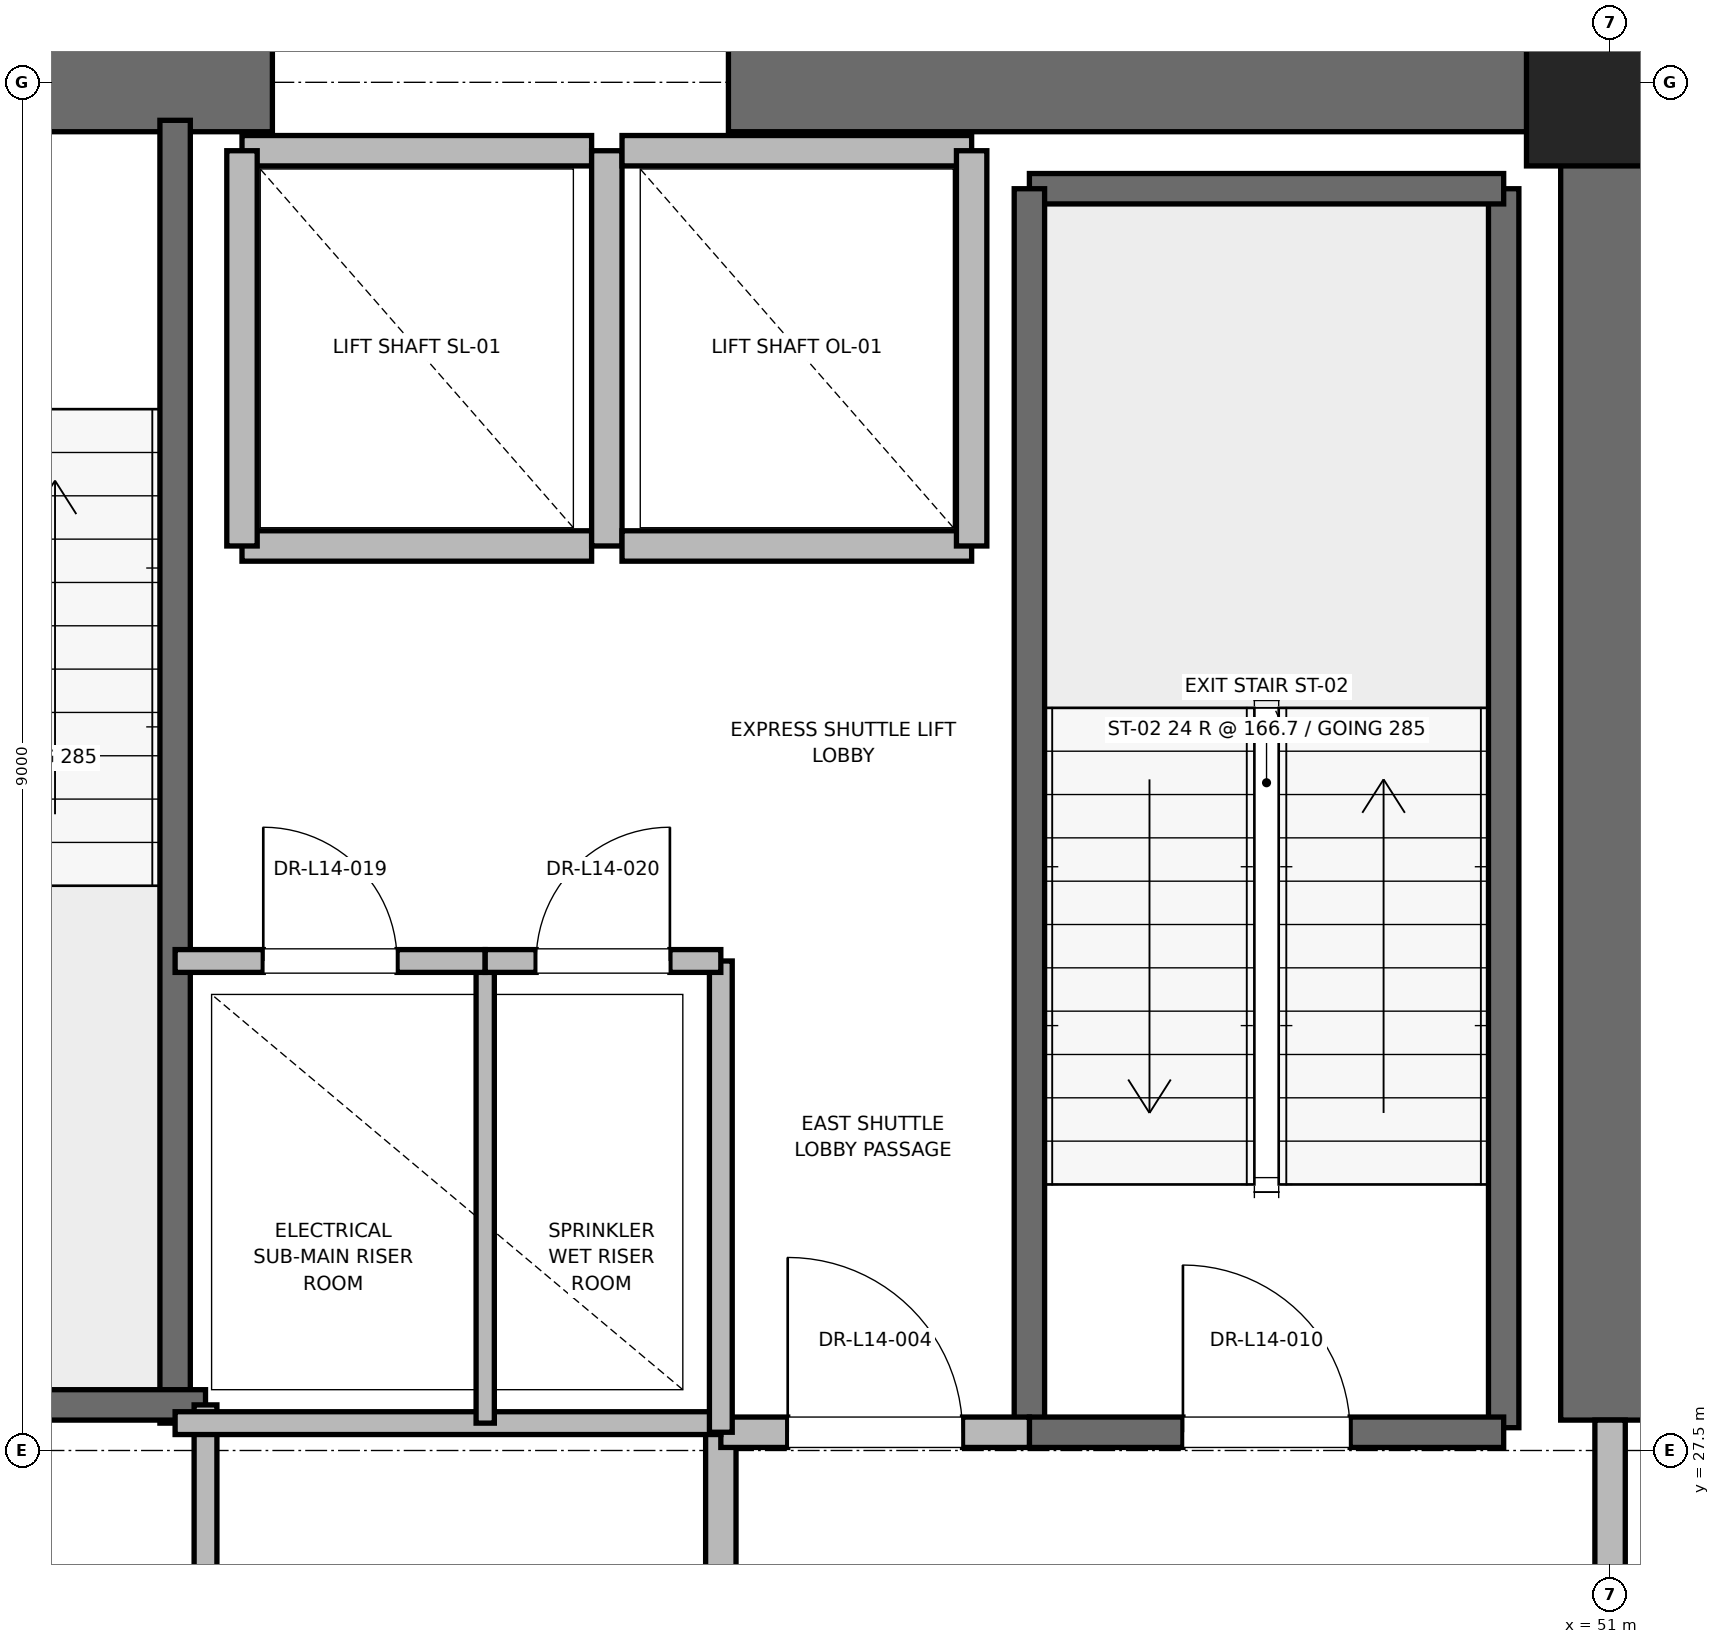
"""IFC4 building model, lengths in metres.
Left out: names, types, materials, properties, quantities, classifications, styles, units other than length and angle.
Written with IfcOpenShell. Run it as: python <this file> out.ifc"""

import sys

from ifc_helpers import new_model, si_unit, direction, frame, frame_2d, origin, origin_2d, place, context, subcontext, project, spatial, rectangle, extrude, element, fill, save


model = new_model("IFC4")
c1 = context("Model", 3, precision=1e-05, world=origin(), true_north=direction((0.0, 1.0)))
c2 = subcontext(c1, "Body", "Model", "MODEL_VIEW")
j1 = project(units=[si_unit("LENGTHUNIT", "METRE"), si_unit("PLANEANGLEUNIT", "RADIAN")], contexts=[c1])
p1 = place(None, origin())
s1 = spatial("IfcSite", under=j1, at=p1, CompositionType="ELEMENT")
p2 = place(p1, origin())
s2 = spatial("IfcBuilding", under=s1, at=p2, CompositionType="ELEMENT")
p3 = place(p2, frame((0.0, 0.0, 63.6)))
s3 = spatial("IfcBuildingStorey", under=s2, at=p3, CompositionType="ELEMENT", Elevation=63.6)
p4 = place(p3, frame((51.0, 36.5, 0.0), z_axis=(0.0, 0.0, 1.0), x_axis=(1.0, 0.0, 0.0)))
e1 = element("IfcColumn", 1, at=p4, inside=s3, PredefinedType="PILASTER", context=c2, shape_type="SweptSolid", body=[
    extrude(rectangle(XDim=1.1, YDim=1.1, at=origin_2d()), origin(), (0.0, 0.0, 1.0), 4.0),
])
p5 = place(p3, frame((37.8, 36.5, 0.0), z_axis=(0.0, 0.0, 1.0), x_axis=(1.0, 0.0, 0.0)))
e2 = element("IfcWall", 2, at=p5, inside=s3, PredefinedType="SHEAR", context=c2, shape_type="SweptSolid", body=[
    extrude(rectangle(XDim=4.4, YDim=0.65, at=frame_2d((2.2, 0.0))), origin(), (0.0, 0.0, 1.0), 3.76),
])
p6 = place(p5, frame((1.65, 0.0, 0.0)))
e3 = element("IfcOpeningElement", 3, at=p6, cuts=e2, PredefinedType="OPENING", context=c2, shape_type="SweptSolid", body=[
    extrude(rectangle(XDim=1.1, YDim=2.15, at=frame_2d((0.55, 1.075))), frame((0.0, 0.325, 0.0), z_axis=(0.0, -1.0, 0.0), x_axis=(1.0, 0.0, 0.0)), (0.0, 0.0, 1.0), 0.65),
])
p7 = place(p3, frame((45.2, 36.5, 0.0), z_axis=(0.0, 0.0, 1.0), x_axis=(1.0, 0.0, 0.0)))
e4 = element("IfcWall", 4, at=p7, inside=s3, PredefinedType="SHEAR", context=c2, shape_type="SweptSolid", body=[
    extrude(rectangle(XDim=5.8, YDim=0.65, at=frame_2d((2.9, 0.0))), origin(), (0.0, 0.0, 1.0), 3.76),
])
p8 = place(p3, frame((51.0, 27.7, 0.0), z_axis=(0.0, 0.0, 1.0), x_axis=(0.0, 1.0, 0.0)))
e5 = element("IfcWall", 5, at=p8, inside=s3, PredefinedType="SHEAR", context=c2, shape_type="SweptSolid", body=[
    extrude(rectangle(XDim=8.8, YDim=0.65, at=frame_2d((4.4, 0.0))), origin(), (0.0, 0.0, 1.0), 3.76),
])
p9 = place(p3, frame((50.3, 27.65, 0.0), z_axis=(0.0, 0.0, 1.0), x_axis=(0.0, 1.0, 0.0)))
e6 = element("IfcWall", 6, at=p9, inside=s3, PredefinedType="SOLIDWALL", context=c2, shape_type="SweptSolid", body=[
    extrude(rectangle(XDim=8.15, YDim=0.2, at=frame_2d((4.075, 0.0))), origin(), (0.0, 0.0, 1.0), 3.76),
])
p10 = place(p3, frame((47.18, 35.8, 0.0), z_axis=(0.0, 0.0, 1.0), x_axis=(1.0, 0.0, 0.0)))
e7 = element("IfcWall", 7, at=p10, inside=s3, PredefinedType="SOLIDWALL", context=c2, shape_type="SweptSolid", body=[
    extrude(rectangle(XDim=3.12, YDim=0.2, at=frame_2d((1.56, 0.0))), origin(), (0.0, 0.0, 1.0), 3.76),
])
p11 = place(p3, frame((47.18, 27.62, 0.0), z_axis=(0.0, 0.0, 1.0), x_axis=(0.0, 1.0, 0.0)))
e8 = element("IfcWall", 8, at=p11, inside=s3, PredefinedType="SOLIDWALL", context=c2, shape_type="SweptSolid", body=[
    extrude(rectangle(XDim=8.18, YDim=0.2, at=frame_2d((4.09, 0.0))), origin(), (0.0, 0.0, 1.0), 3.76),
])
p12 = place(p3, frame((47.18, 27.62, 0.0), z_axis=(0.0, 0.0, 1.0), x_axis=(1.0, 0.0, 0.0)))
e9 = element("IfcWall", 9, at=p12, inside=s3, PredefinedType="SOLIDWALL", context=c2, shape_type="SweptSolid", body=[
    extrude(rectangle(XDim=3.12, YDim=0.2, at=frame_2d((1.56, 0.0))), origin(), (0.0, 0.0, 1.0), 3.76),
])
p13 = place(p12, frame((1.01, 0.0, 0.0)))
e10 = element("IfcOpeningElement", 10, at=p13, cuts=e9, PredefinedType="OPENING", context=c2, shape_type="SweptSolid", body=[
    extrude(rectangle(XDim=1.1, YDim=2.15, at=frame_2d((0.55, 1.075))), frame((0.0, 0.1, 0.0), z_axis=(0.0, -1.0, 0.0), x_axis=(1.0, 0.0, 0.0)), (0.0, 0.0, 1.0), 0.2),
])
p14 = place(p3, frame((41.56, 27.68, 0.0), z_axis=(0.0, 0.0, 1.0), x_axis=(0.0, 1.0, 0.0)))
e11 = element("IfcWall", 11, at=p14, inside=s3, PredefinedType="SOLIDWALL", context=c2, shape_type="SweptSolid", body=[
    extrude(rectangle(XDim=8.57, YDim=0.2, at=frame_2d((4.285, 0.0))), origin(), (0.0, 0.0, 1.0), 3.76),
])
p15 = place(p3, frame((38.44, 27.8, 0.0), z_axis=(0.0, 0.0, 1.0), x_axis=(1.0, 0.0, 0.0)))
e12 = element("IfcWall", 12, at=p15, inside=s3, PredefinedType="SOLIDWALL", context=c2, shape_type="SweptSolid", body=[
    extrude(rectangle(XDim=3.32, YDim=0.2, at=frame_2d((1.66, 0.0))), origin(), (0.0, 0.0, 1.0), 3.76),
])
p16 = place(p3, frame((45.15, 24.25, 0.0), z_axis=(0.0, 0.0, 1.0), x_axis=(0.0, 1.0, 0.0)))
e13 = element("IfcWall", 13, at=p16, inside=s3, PredefinedType="PARTITIONING", context=c2, shape_type="SweptSolid", body=[
    extrude(rectangle(XDim=3.37, YDim=0.2, at=frame_2d((1.685, 0.0))), origin(), (0.0, 0.0, 1.0), 3.76),
])
p17 = place(p3, frame((45.15, 27.62, 0.0), z_axis=(0.0, 0.0, 1.0), x_axis=(1.0, 0.0, 0.0)))
e14 = element("IfcWall", 14, at=p17, inside=s3, PredefinedType="PARTITIONING", context=c2, shape_type="SweptSolid", body=[
    extrude(rectangle(XDim=2.03, YDim=0.2, at=frame_2d((1.015, 0.0))), origin(), (0.0, 0.0, 1.0), 3.76),
])
p18 = place(p17, frame((0.44, 0.0, 0.0)))
e15 = element("IfcOpeningElement", 15, at=p18, cuts=e14, PredefinedType="OPENING", context=c2, shape_type="SweptSolid", body=[
    extrude(rectangle(XDim=1.15, YDim=2.2, at=frame_2d((0.575, 1.1))), frame((0.0, 0.1, 0.0), z_axis=(0.0, -1.0, 0.0), x_axis=(1.0, 0.0, 0.0)), (0.0, 0.0, 1.0), 0.2),
])
p19 = place(p3, frame((51.0, 24.3, 0.0), z_axis=(0.0, 0.0, 1.0), x_axis=(0.0, 1.0, 0.0)))
e16 = element("IfcWall", 16, at=p19, inside=s3, PredefinedType="PARTITIONING", context=c2, shape_type="SweptSolid", body=[
    extrude(rectangle(XDim=3.4, YDim=0.2, at=frame_2d((1.7, 0.0))), origin(), (0.0, 0.0, 1.0), 2.54),
])
p20 = place(p19, frame((1.125, 0.0, 0.0)))
e17 = element("IfcOpeningElement", 17, at=p20, cuts=e16, PredefinedType="OPENING", context=c2, shape_type="SweptSolid", body=[
    extrude(rectangle(XDim=1.15, YDim=2.2, at=frame_2d((0.575, 1.1))), frame((0.0, 0.1, 0.0), z_axis=(0.0, -1.0, 0.0), x_axis=(1.0, 0.0, 0.0)), (0.0, 0.0, 1.0), 0.2),
])
p21 = place(p3, frame((42.0, 33.45, 0.0), z_axis=(0.0, 0.0, 1.0), x_axis=(1.0, 0.0, 0.0)))
e18 = element("IfcWall", 18, at=p21, inside=s3, PredefinedType="SOLIDWALL", context=c2, shape_type="SweptSolid", body=[
    extrude(rectangle(XDim=2.3, YDim=0.2, at=frame_2d((1.15, 0.0))), origin(), (0.0, 0.0, 1.0), 3.76),
])
p22 = place(p3, frame((44.3, 36.05, 0.0), z_axis=(0.0, 0.0, 1.0), x_axis=(-1.0, 0.0, 0.0)))
e19 = element("IfcWall", 19, at=p22, inside=s3, PredefinedType="SOLIDWALL", context=c2, shape_type="SweptSolid", body=[
    extrude(rectangle(XDim=2.3, YDim=0.2, at=frame_2d((1.15, 0.0))), origin(), (0.0, 0.0, 1.0), 2.54),
])
for number, where, z_axis, x_axis in (
    (20, (42.0, 36.05, 0.0), (0.0, 0.0, 1.0), (0.0, -1.0, 0.0)),
    (21, (44.4, 33.45, 0.0), (0.0, 0.0, 1.0), (0.0, 1.0, 0.0)),
):
    element("IfcWall", number, at=place(p3, frame(where, z_axis=z_axis, x_axis=x_axis)), inside=s3, PredefinedType="SOLIDWALL", context=c2, shape_type="SweptSolid", body=[
        extrude(rectangle(XDim=2.6, YDim=0.2, at=frame_2d((1.3, 0.0))), origin(), (0.0, 0.0, 1.0), 2.54),
    ])
p23 = place(p3, frame((44.5, 33.45, 0.0), z_axis=(0.0, 0.0, 1.0), x_axis=(1.0, 0.0, 0.0)))
e22 = element("IfcWall", 22, at=p23, inside=s3, PredefinedType="SOLIDWALL", context=c2, shape_type="SweptSolid", body=[
    extrude(rectangle(XDim=2.3, YDim=0.2, at=frame_2d((1.15, 0.0))), origin(), (0.0, 0.0, 1.0), 3.76),
])
p24 = place(p3, frame((46.8, 36.05, 0.0), z_axis=(0.0, 0.0, 1.0), x_axis=(-1.0, 0.0, 0.0)))
e23 = element("IfcWall", 23, at=p24, inside=s3, PredefinedType="SOLIDWALL", context=c2, shape_type="SweptSolid", body=[
    extrude(rectangle(XDim=2.3, YDim=0.2, at=frame_2d((1.15, 0.0))), origin(), (0.0, 0.0, 1.0), 2.54),
])
p25 = place(p3, frame((46.8, 33.45, 0.0), z_axis=(0.0, 0.0, 1.0), x_axis=(0.0, 1.0, 0.0)))
e24 = element("IfcWall", 24, at=p25, inside=s3, PredefinedType="SOLIDWALL", context=c2, shape_type="SweptSolid", body=[
    extrude(rectangle(XDim=2.6, YDim=0.2, at=frame_2d((1.3, 0.0))), origin(), (0.0, 0.0, 1.0), 3.76),
])
p26 = place(p3, frame((41.76, 23.8, 0.0), z_axis=(0.0, 0.0, 1.0), x_axis=(0.0, 1.0, 0.0)))
e25 = element("IfcWall", 25, at=p26, inside=s3, PredefinedType="PARTITIONING", context=c2, shape_type="SweptSolid", body=[
    extrude(rectangle(XDim=4.0, YDim=0.15, at=frame_2d((2.0, 0.0))), origin(), (0.0, 0.0, 1.0), 2.85),
])
p27 = place(p3, frame((41.56, 27.68, 0.0), z_axis=(0.0, 0.0, 1.0), x_axis=(1.0, 0.0, 0.0)))
e26 = element("IfcWall", 26, at=p27, inside=s3, PredefinedType="PARTITIONING", context=c2, shape_type="SweptSolid", body=[
    extrude(rectangle(XDim=3.59, YDim=0.15, at=frame_2d((1.795, 0.0))), origin(), (0.0, 0.0, 1.0), 2.85),
])
p28 = place(p3, frame((45.15, 27.62, 0.0), z_axis=(0.0, 0.0, 1.0), x_axis=(0.0, 1.0, 0.0)))
e27 = element("IfcWall", 27, at=p28, inside=s3, PredefinedType="PARTITIONING", context=c2, shape_type="SweptSolid", body=[
    extrude(rectangle(XDim=3.1, YDim=0.15, at=frame_2d((1.55, 0.0))), origin(), (0.0, 0.0, 1.0), 2.85),
])
p29 = place(p3, frame((43.6, 27.68, 0.0), z_axis=(0.0, 0.0, 1.0), x_axis=(0.0, 1.0, 0.0)))
e28 = element("IfcWall", 28, at=p29, inside=s3, PredefinedType="PARTITIONING", context=c2, shape_type="SweptSolid", body=[
    extrude(rectangle(XDim=3.04, YDim=0.12, at=frame_2d((1.52, 0.0))), origin(), (0.0, 0.0, 1.0), 2.85),
])
p30 = place(p3, frame((41.56, 30.72, 0.0), z_axis=(0.0, 0.0, 1.0), x_axis=(1.0, 0.0, 0.0)))
e29 = element("IfcWall", 29, at=p30, inside=s3, PredefinedType="PARTITIONING", context=c2, shape_type="SweptSolid", body=[
    extrude(rectangle(XDim=2.04, YDim=0.15, at=frame_2d((1.02, 0.0))), origin(), (0.0, 0.0, 1.0), 2.85),
])
p31 = place(p30, frame((0.58, 0.0, 0.0)))
e30 = element("IfcOpeningElement", 30, at=p31, cuts=e29, PredefinedType="OPENING", context=c2, shape_type="SweptSolid", body=[
    extrude(rectangle(XDim=0.88, YDim=2.1, at=frame_2d((0.44, 1.05))), frame((0.0, 0.075, 0.0), z_axis=(0.0, -1.0, 0.0), x_axis=(1.0, 0.0, 0.0)), (0.0, 0.0, 1.0), 0.15),
])
p32 = place(p3, frame((43.6, 30.72, 0.0), z_axis=(0.0, 0.0, 1.0), x_axis=(1.0, 0.0, 0.0)))
e31 = element("IfcWall", 31, at=p32, inside=s3, PredefinedType="PARTITIONING", context=c2, shape_type="SweptSolid", body=[
    extrude(rectangle(XDim=1.55, YDim=0.15, at=frame_2d((0.775, 0.0))), origin(), (0.0, 0.0, 1.0), 2.85),
])
p33 = place(p32, frame((0.335, 0.0, 0.0)))
e32 = element("IfcOpeningElement", 32, at=p33, cuts=e31, PredefinedType="OPENING", context=c2, shape_type="SweptSolid", body=[
    extrude(rectangle(XDim=0.88, YDim=2.1, at=frame_2d((0.44, 1.05))), frame((0.0, 0.075, 0.0), z_axis=(0.0, -1.0, 0.0), x_axis=(1.0, 0.0, 0.0)), (0.0, 0.0, 1.0), 0.15),
])
p34 = place(p13, origin())
e33 = element("IfcDoor", 33, at=p34, inside=s3, OperationType="SINGLE_SWING_LEFT", PredefinedType="DOOR", context=c2, shape_type="SweptSolid", body=[
    extrude(rectangle(XDim=1.1, YDim=2.15, at=frame_2d((0.55, 1.075))), frame((0.0, 0.025, 0.0), z_axis=(0.0, -1.0, 0.0), x_axis=(1.0, 0.0, 0.0)), (0.0, 0.0, 1.0), 0.05),
])
fill(e10, e33)
p35 = place(p18, origin())
e34 = element("IfcDoor", 34, at=p35, inside=s3, OperationType="SINGLE_SWING_LEFT", PredefinedType="DOOR", context=c2, shape_type="SweptSolid", body=[
    extrude(rectangle(XDim=1.15, YDim=2.2, at=frame_2d((0.575, 1.1))), frame((0.0, 0.025, 0.0), z_axis=(0.0, -1.0, 0.0), x_axis=(1.0, 0.0, 0.0)), (0.0, 0.0, 1.0), 0.05),
])
fill(e15, e34)
p36 = place(p31, origin())
e35 = element("IfcDoor", 35, at=p36, inside=s3, OperationType="SINGLE_SWING_LEFT", PredefinedType="DOOR", context=c2, shape_type="SweptSolid", body=[
    extrude(rectangle(XDim=0.88, YDim=2.1, at=frame_2d((0.44, 1.05))), frame((0.0, 0.025, 0.0), z_axis=(0.0, -1.0, 0.0), x_axis=(1.0, 0.0, 0.0)), (0.0, 0.0, 1.0), 0.05),
])
fill(e30, e35)
p37 = place(p33, origin())
e36 = element("IfcDoor", 36, at=p37, inside=s3, OperationType="SINGLE_SWING_RIGHT", PredefinedType="DOOR", context=c2, shape_type="SweptSolid", body=[
    extrude(rectangle(XDim=0.88, YDim=2.1, at=frame_2d((0.44, 1.05))), frame((0.0, 0.025, 0.0), z_axis=(0.0, -1.0, 0.0), x_axis=(1.0, 0.0, 0.0)), (0.0, 0.0, 1.0), 0.05),
])
fill(e32, e36)
save(model, sys.argv[1])
